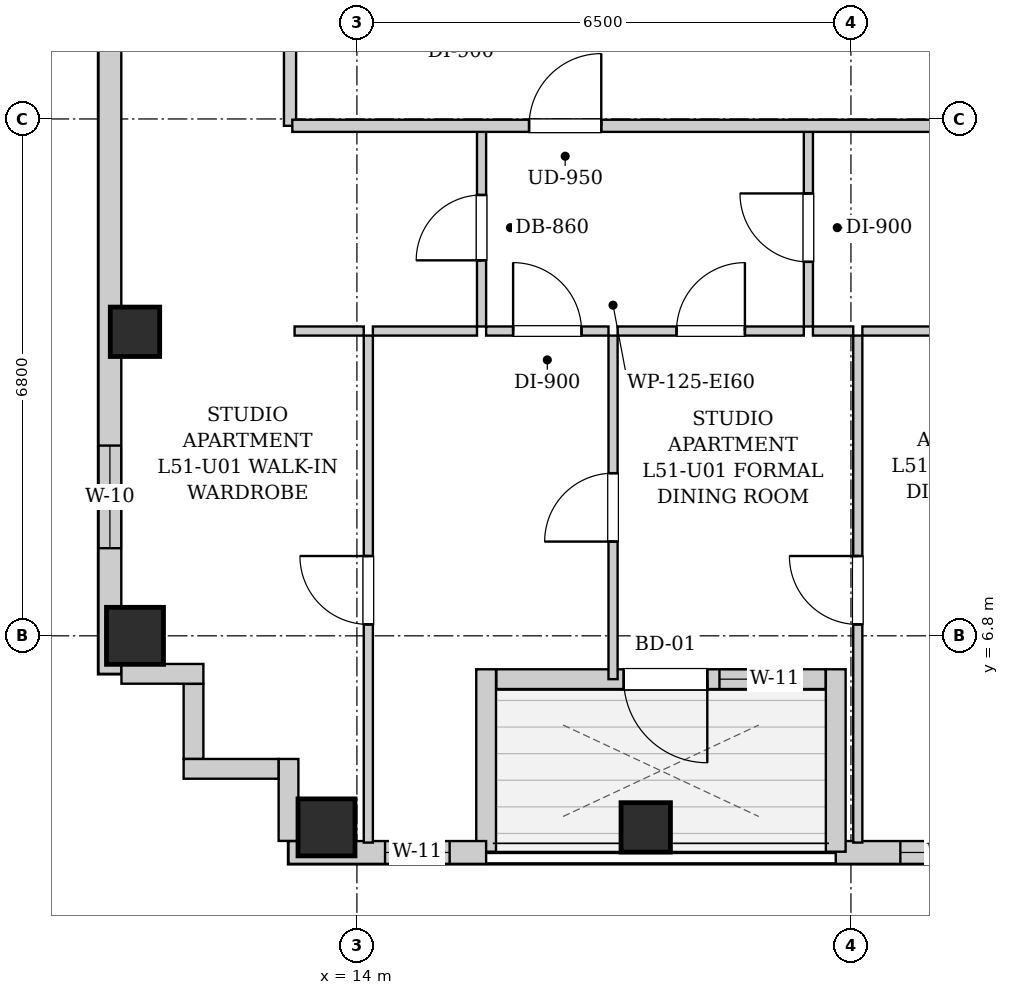
"""IFC4 building model, lengths in metres.
Left out: names, types, materials, properties, quantities, classifications, styles, units other than length and angle.
Written with IfcOpenShell. Run it as: python <this file> out.ifc"""

import sys

from ifc_helpers import new_model, si_unit, direction, frame, frame_2d, origin, origin_2d, place, context, subcontext, project, spatial, rectangle, extrude, element, fill, save


model = new_model("IFC4")
c1 = context("Model", 3, precision=1e-05, world=origin(), true_north=direction((0.0, 1.0)))
c2 = subcontext(c1, "Body", "Model", "MODEL_VIEW")
j1 = project(units=[si_unit("LENGTHUNIT", "METRE"), si_unit("PLANEANGLEUNIT", "RADIAN")], contexts=[c1])
p1 = place(None, origin())
s1 = spatial("IfcSite", under=j1, at=p1, CompositionType="ELEMENT")
p2 = place(p1, origin())
s2 = spatial("IfcBuilding", under=s1, at=p2, CompositionType="ELEMENT")
p3 = place(p2, frame((0.0, 0.0, 177.7)))
s3 = spatial("IfcBuildingStorey", under=s2, at=p3, CompositionType="ELEMENT", Elevation=177.7)
p4 = place(p3, frame((13.6, 4.28, 0.0), z_axis=(0.0, 0.0, 1.0), x_axis=(1.0, 0.0, 0.0)))
e1 = element("IfcColumn", 1, at=p4, inside=s3, PredefinedType="COLUMN", context=c2, shape_type="SweptSolid", body=[
    extrude(rectangle(XDim=0.75, YDim=0.75, at=origin_2d()), origin(), (0.0, 0.0, 1.0), 3.3),
])
p5 = place(p3, frame((17.8, 4.28, 0.0), z_axis=(0.0, 0.0, 1.0), x_axis=(1.0, 0.0, 0.0)))
e2 = element("IfcColumn", 2, at=p5, inside=s3, PredefinedType="COLUMN", context=c2, shape_type="SweptSolid", body=[
    extrude(rectangle(XDim=0.65, YDim=0.65, at=origin_2d()), origin(), (0.0, 0.0, 1.0), 3.3),
])
p6 = place(p3, frame((11.08, 6.8, 0.0), z_axis=(0.0, 0.0, 1.0), x_axis=(1.0, 0.0, 0.0)))
e3 = element("IfcColumn", 3, at=p6, inside=s3, PredefinedType="COLUMN", context=c2, shape_type="SweptSolid", body=[
    extrude(rectangle(XDim=0.75, YDim=0.75, at=origin_2d()), origin(), (0.0, 0.0, 1.0), 3.3),
])
p7 = place(p3, frame((11.08, 10.8, 0.0), z_axis=(0.0, 0.0, 1.0), x_axis=(1.0, 0.0, 0.0)))
e4 = element("IfcColumn", 4, at=p7, inside=s3, PredefinedType="COLUMN", context=c2, shape_type="SweptSolid", body=[
    extrude(rectangle(XDim=0.65, YDim=0.65, at=origin_2d()), origin(), (0.0, 0.0, 1.0), 3.3),
])
p8 = place(p3, frame((31.5, 3.95, 0.0), z_axis=(0.0, 0.0, 1.0), x_axis=(-1.0, 0.0, 0.0)))
e5 = element("IfcWall", 5, at=p8, inside=s3, PredefinedType="SOLIDWALL", context=c2, shape_type="SweptSolid", body=[
    extrude(rectangle(XDim=11.2, YDim=0.3, at=frame_2d((5.6, 0.0))), origin(), (0.0, 0.0, 1.0), 3.04),
])
p9 = place(p8, frame((9.0, 0.0, 0.55)))
e6 = element("IfcOpeningElement", 6, at=p9, cuts=e5, PredefinedType="OPENING", context=c2, shape_type="SweptSolid", body=[
    extrude(rectangle(XDim=1.35, YDim=1.2, at=frame_2d((0.675, 0.6))), frame((0.0, 0.16, 0.0), z_axis=(0.0, -1.0, 0.0), x_axis=(1.0, 0.0, 0.0)), (0.0, 0.0, 1.0), 0.32),
])
p10 = place(p8, frame((2.201, 0.0, 0.55)))
e7 = element("IfcOpeningElement", 7, at=p10, cuts=e5, PredefinedType="OPENING", context=c2, shape_type="SweptSolid", body=[
    extrude(rectangle(XDim=1.35, YDim=1.2, at=frame_2d((0.675, 0.6))), frame((0.0, 0.16, 0.0), z_axis=(0.0, -1.0, 0.0), x_axis=(1.0, 0.0, 0.0)), (0.0, 0.0, 1.0), 0.32),
])
p11 = place(p8, frame((0.35, 0.0, 0.55)))
e8 = element("IfcOpeningElement", 8, at=p11, cuts=e5, PredefinedType="OPENING", context=c2, shape_type="SweptSolid", body=[
    extrude(rectangle(XDim=0.68, YDim=1.2, at=frame_2d((0.34, 0.6))), frame((0.0, 0.16, 0.0), z_axis=(0.0, -1.0, 0.0), x_axis=(1.0, 0.0, 0.0)), (0.0, 0.0, 1.0), 0.32),
])
p12 = place(p3, frame((20.3, 3.96, 0.0), z_axis=(0.0, 0.0, 1.0), x_axis=(0.0, 1.0, 0.0)))
e9 = element("IfcWall", 9, at=p12, inside=s3, PredefinedType="SOLIDWALL", context=c2, shape_type="SweptSolid", body=[
    extrude(rectangle(XDim=2.4, YDim=0.26, at=frame_2d((1.2, 0.0))), origin(), (0.0, 0.0, 1.0), 3.04),
])
p13 = place(p3, frame((20.166, 6.23, 0.0), z_axis=(0.0, 0.0, 1.0), x_axis=(-1.0, 0.0, 0.0)))
e10 = element("IfcWall", 10, at=p13, inside=s3, PredefinedType="SOLIDWALL", context=c2, shape_type="SweptSolid", body=[
    extrude(rectangle(XDim=4.332, YDim=0.26, at=frame_2d((2.166, 0.0))), origin(), (0.0, 0.0, 1.0), 3.04),
])
p14 = place(p13, frame((1.556, 0.0, 0.0)))
e11 = element("IfcOpeningElement", 11, at=p14, cuts=e10, PredefinedType="OPENING", context=c2, shape_type="SweptSolid", body=[
    extrude(rectangle(XDim=1.1, YDim=2.0, at=frame_2d((0.55, 1.0))), frame((0.0, 0.14, 0.0), z_axis=(0.0, -1.0, 0.0), x_axis=(1.0, 0.0, 0.0)), (0.0, 0.0, 1.0), 0.28),
])
p15 = place(p13, frame((0.546, 0.0, 0.55)))
e12 = element("IfcOpeningElement", 12, at=p15, cuts=e10, PredefinedType="OPENING", context=c2, shape_type="SweptSolid", body=[
    extrude(rectangle(XDim=0.85, YDim=1.2, at=frame_2d((0.425, 0.6))), frame((0.0, 0.14, 0.0), z_axis=(0.0, -1.0, 0.0), x_axis=(1.0, 0.0, 0.0)), (0.0, 0.0, 1.0), 0.28),
])
p16 = place(p3, frame((15.7, 6.36, 0.0), z_axis=(0.0, 0.0, 1.0), x_axis=(0.0, -1.0, 0.0)))
e13 = element("IfcWall", 13, at=p16, inside=s3, PredefinedType="SOLIDWALL", context=c2, shape_type="SweptSolid", body=[
    extrude(rectangle(XDim=2.4, YDim=0.26, at=frame_2d((1.2, 0.0))), origin(), (0.0, 0.0, 1.0), 3.04),
])
p17 = place(p3, frame((15.7, 3.95, 0.0), z_axis=(0.0, 0.0, 1.0), x_axis=(-1.0, 0.0, 0.0)))
e14 = element("IfcWall", 14, at=p17, inside=s3, PredefinedType="SOLIDWALL", context=c2, shape_type="SweptSolid", body=[
    extrude(rectangle(XDim=2.6, YDim=0.3, at=frame_2d((1.3, 0.0))), origin(), (0.0, 0.0, 1.0), 3.04),
])
p18 = place(p17, frame((0.48, 0.0, 0.55)))
e15 = element("IfcOpeningElement", 15, at=p18, cuts=e14, PredefinedType="OPENING", context=c2, shape_type="SweptSolid", body=[
    extrude(rectangle(XDim=0.85, YDim=1.2, at=frame_2d((0.425, 0.6))), frame((0.0, 0.16, 0.0), z_axis=(0.0, -1.0, 0.0), x_axis=(1.0, 0.0, 0.0)), (0.0, 0.0, 1.0), 0.32),
])
p19 = place(p3, frame((10.75, 6.3, 0.0), z_axis=(0.0, 0.0, 1.0), x_axis=(0.0, 1.0, 0.0)))
e16 = element("IfcWall", 16, at=p19, inside=s3, PredefinedType="SOLIDWALL", context=c2, shape_type="SweptSolid", body=[
    extrude(rectangle(XDim=31.4, YDim=0.3, at=frame_2d((15.7, 0.0))), origin(), (0.0, 0.0, 1.0), 3.04),
])
p20 = place(p19, frame((1.653, 0.0, 0.55)))
e17 = element("IfcOpeningElement", 17, at=p20, cuts=e16, PredefinedType="OPENING", context=c2, shape_type="SweptSolid", body=[
    extrude(rectangle(XDim=1.35, YDim=1.2, at=frame_2d((0.675, 0.6))), frame((0.0, 0.16, 0.0), z_axis=(0.0, -1.0, 0.0), x_axis=(1.0, 0.0, 0.0)), (0.0, 0.0, 1.0), 0.32),
])
p21 = place(p19, frame((11.85, 0.0, 0.55)))
e18 = element("IfcOpeningElement", 18, at=p21, cuts=e16, PredefinedType="OPENING", context=c2, shape_type="SweptSolid", body=[
    extrude(rectangle(XDim=1.35, YDim=1.2, at=frame_2d((0.675, 0.6))), frame((0.0, 0.16, 0.0), z_axis=(0.0, -1.0, 0.0), x_axis=(1.0, 0.0, 0.0)), (0.0, 0.0, 1.0), 0.32),
])
p22 = place(p19, frame((9.185, 0.0, 0.55)))
e19 = element("IfcOpeningElement", 19, at=p22, cuts=e16, PredefinedType="OPENING", context=c2, shape_type="SweptSolid", body=[
    extrude(rectangle(XDim=1.35, YDim=1.2, at=frame_2d((0.675, 0.6))), frame((0.0, 0.16, 0.0), z_axis=(0.0, -1.0, 0.0), x_axis=(1.0, 0.0, 0.0)), (0.0, 0.0, 1.0), 0.32),
])
p23 = place(p19, frame((21.209, 0.0, 0.55)))
e20 = element("IfcOpeningElement", 20, at=p23, cuts=e16, PredefinedType="OPENING", context=c2, shape_type="SweptSolid", body=[
    extrude(rectangle(XDim=0.85, YDim=1.2, at=frame_2d((0.425, 0.6))), frame((0.0, 0.16, 0.0), z_axis=(0.0, -1.0, 0.0), x_axis=(1.0, 0.0, 0.0)), (0.0, 0.0, 1.0), 0.32),
])
p24 = place(p3, frame((13.1, 4.102, 0.0), z_axis=(0.0, 0.0, 1.0), x_axis=(0.0, 1.0, 0.0)))
e21 = element("IfcWall", 21, at=p24, inside=s3, PredefinedType="SOLIDWALL", context=c2, shape_type="SweptSolid", body=[
    extrude(rectangle(XDim=1.078, YDim=0.26, at=frame_2d((0.539, 0.0))), origin(), (0.0, 0.0, 1.0), 3.04),
])
p25 = place(p3, frame((12.968, 5.05, 0.0), z_axis=(0.0, 0.0, 1.0), x_axis=(-1.0, 0.0, 0.0)))
e22 = element("IfcWall", 22, at=p25, inside=s3, PredefinedType="SOLIDWALL", context=c2, shape_type="SweptSolid", body=[
    extrude(rectangle(XDim=1.248, YDim=0.26, at=frame_2d((0.624, 0.0))), origin(), (0.0, 0.0, 1.0), 3.04),
])
p26 = place(p3, frame((11.85, 5.182, 0.0), z_axis=(0.0, 0.0, 1.0), x_axis=(0.0, 1.0, 0.0)))
e23 = element("IfcWall", 23, at=p26, inside=s3, PredefinedType="SOLIDWALL", context=c2, shape_type="SweptSolid", body=[
    extrude(rectangle(XDim=0.986, YDim=0.26, at=frame_2d((0.493, 0.0))), origin(), (0.0, 0.0, 1.0), 3.04),
])
p27 = place(p3, frame((11.98, 6.3, 0.0), z_axis=(0.0, 0.0, 1.0), x_axis=(-1.0, 0.0, 0.0)))
e24 = element("IfcWall", 24, at=p27, inside=s3, PredefinedType="SOLIDWALL", context=c2, shape_type="SweptSolid", body=[
    extrude(rectangle(XDim=1.078, YDim=0.26, at=frame_2d((0.539, 0.0))), origin(), (0.0, 0.0, 1.0), 3.04),
])
p28 = place(p3, frame((13.12, 13.51, 0.0), z_axis=(0.0, 0.0, 1.0), x_axis=(0.0, 1.0, 0.0)))
e25 = element("IfcWall", 25, at=p28, inside=s3, PredefinedType="PARTITIONING", context=c2, shape_type="SweptSolid", body=[
    extrude(rectangle(XDim=1.58, YDim=0.16, at=frame_2d((0.79, 0.0))), origin(), (0.0, 0.0, 1.0), 3.04),
])
p29 = place(p3, frame((15.64, 10.87, 0.0), z_axis=(0.0, 0.0, 1.0), x_axis=(0.0, 1.0, 0.0)))
e26 = element("IfcWall", 26, at=p29, inside=s3, PredefinedType="PARTITIONING", context=c2, shape_type="SweptSolid", body=[
    extrude(rectangle(XDim=2.6, YDim=0.12, at=frame_2d((1.3, 0.0))), origin(), (0.0, 0.0, 1.0), 3.04),
])
p30 = place(p29, frame((0.87, 0.0, 0.0)))
e27 = element("IfcOpeningElement", 27, at=p30, cuts=e26, PredefinedType="OPENING", context=c2, shape_type="SweptSolid", body=[
    extrude(rectangle(XDim=0.86, YDim=2.05, at=frame_2d((0.43, 1.025))), frame((0.0, 0.07, 0.0), z_axis=(0.0, -1.0, 0.0), x_axis=(1.0, 0.0, 0.0)), (0.0, 0.0, 1.0), 0.14),
])
p31 = place(p3, frame((13.18, 10.81, 0.0), z_axis=(0.0, 0.0, 1.0), x_axis=(1.0, 0.0, 0.0)))
e28 = element("IfcWall", 28, at=p31, inside=s3, PredefinedType="PARTITIONING", context=c2, shape_type="SweptSolid", body=[
    extrude(rectangle(XDim=0.91, YDim=0.12, at=frame_2d((0.455, 0.0))), origin(), (0.0, 0.0, 1.0), 3.04),
])
p32 = place(p3, frame((14.21, 10.81, 0.0), z_axis=(0.0, 0.0, 1.0), x_axis=(1.0, 0.0, 0.0)))
e29 = element("IfcWall", 29, at=p32, inside=s3, PredefinedType="PARTITIONING", context=c2, shape_type="SweptSolid", body=[
    extrude(rectangle(XDim=1.37, YDim=0.12, at=frame_2d((0.685, 0.0))), origin(), (0.0, 0.0, 1.0), 3.04),
])
p33 = place(p3, frame((19.94, 10.87, 0.0), z_axis=(0.0, 0.0, 1.0), x_axis=(0.0, 1.0, 0.0)))
e30 = element("IfcWall", 30, at=p33, inside=s3, PredefinedType="PARTITIONING", context=c2, shape_type="SweptSolid", body=[
    extrude(rectangle(XDim=2.6, YDim=0.12, at=frame_2d((1.3, 0.0))), origin(), (0.0, 0.0, 1.0), 3.04),
])
p34 = place(p33, frame((0.85, 0.0, 0.0)))
e31 = element("IfcOpeningElement", 31, at=p34, cuts=e30, PredefinedType="OPENING", context=c2, shape_type="SweptSolid", body=[
    extrude(rectangle(XDim=0.9, YDim=2.05, at=frame_2d((0.45, 1.025))), frame((0.0, 0.07, 0.0), z_axis=(0.0, -1.0, 0.0), x_axis=(1.0, 0.0, 0.0)), (0.0, 0.0, 1.0), 0.14),
])
p35 = place(p3, frame((15.7, 10.81, 0.0), z_axis=(0.0, 0.0, 1.0), x_axis=(1.0, 0.0, 0.0)))
e32 = element("IfcWall", 32, at=p35, inside=s3, PredefinedType="PARTITIONING", context=c2, shape_type="SweptSolid", body=[
    extrude(rectangle(XDim=1.61, YDim=0.12, at=frame_2d((0.805, 0.0))), origin(), (0.0, 0.0, 1.0), 3.04),
])
p36 = place(p35, frame((0.355, 0.0, 0.0)))
e33 = element("IfcOpeningElement", 33, at=p36, cuts=e32, PredefinedType="OPENING", context=c2, shape_type="SweptSolid", body=[
    extrude(rectangle(XDim=0.9, YDim=2.05, at=frame_2d((0.45, 1.025))), frame((0.0, 0.07, 0.0), z_axis=(0.0, -1.0, 0.0), x_axis=(1.0, 0.0, 0.0)), (0.0, 0.0, 1.0), 0.14),
])
p37 = place(p3, frame((17.43, 10.81, 0.0), z_axis=(0.0, 0.0, 1.0), x_axis=(1.0, 0.0, 0.0)))
e34 = element("IfcWall", 34, at=p37, inside=s3, PredefinedType="PARTITIONING", context=c2, shape_type="SweptSolid", body=[
    extrude(rectangle(XDim=2.45, YDim=0.12, at=frame_2d((1.225, 0.0))), origin(), (0.0, 0.0, 1.0), 3.04),
])
p38 = place(p37, frame((0.775, 0.0, 0.0)))
e35 = element("IfcOpeningElement", 35, at=p38, cuts=e34, PredefinedType="OPENING", context=c2, shape_type="SweptSolid", body=[
    extrude(rectangle(XDim=0.9, YDim=2.05, at=frame_2d((0.45, 1.025))), frame((0.0, 0.07, 0.0), z_axis=(0.0, -1.0, 0.0), x_axis=(1.0, 0.0, 0.0)), (0.0, 0.0, 1.0), 0.14),
])
p39 = place(p3, frame((20.0, 10.81, 0.0), z_axis=(0.0, 0.0, 1.0), x_axis=(1.0, 0.0, 0.0)))
e36 = element("IfcWall", 36, at=p39, inside=s3, PredefinedType="PARTITIONING", context=c2, shape_type="SweptSolid", body=[
    extrude(rectangle(XDim=0.53, YDim=0.12, at=frame_2d((0.265, 0.0))), origin(), (0.0, 0.0, 1.0), 3.04),
])
p40 = place(p3, frame((20.65, 10.81, 0.0), z_axis=(0.0, 0.0, 1.0), x_axis=(1.0, 0.0, 0.0)))
e37 = element("IfcWall", 37, at=p40, inside=s3, PredefinedType="PARTITIONING", context=c2, shape_type="SweptSolid", body=[
    extrude(rectangle(XDim=2.735, YDim=0.12, at=frame_2d((1.368, 0.0))), origin(), (0.0, 0.0, 1.0), 3.04),
])
p41 = place(p40, frame((0.918, 0.0, 0.0)))
e38 = element("IfcOpeningElement", 38, at=p41, cuts=e37, PredefinedType="OPENING", context=c2, shape_type="SweptSolid", body=[
    extrude(rectangle(XDim=0.9, YDim=2.05, at=frame_2d((0.45, 1.025))), frame((0.0, 0.07, 0.0), z_axis=(0.0, -1.0, 0.0), x_axis=(1.0, 0.0, 0.0)), (0.0, 0.0, 1.0), 0.14),
])
p42 = place(p3, frame((14.15, 4.08, 0.0), z_axis=(0.0, 0.0, 1.0), x_axis=(0.0, 1.0, 0.0)))
e39 = element("IfcWall", 39, at=p42, inside=s3, PredefinedType="PARTITIONING", context=c2, shape_type="SweptSolid", body=[
    extrude(rectangle(XDim=6.67, YDim=0.12, at=frame_2d((3.335, 0.0))), origin(), (0.0, 0.0, 1.0), 3.04),
])
p43 = place(p42, frame((2.87, 0.0, 0.0)))
e40 = element("IfcOpeningElement", 40, at=p43, cuts=e39, PredefinedType="OPENING", context=c2, shape_type="SweptSolid", body=[
    extrude(rectangle(XDim=0.9, YDim=2.05, at=frame_2d((0.45, 1.025))), frame((0.0, 0.07, 0.0), z_axis=(0.0, -1.0, 0.0), x_axis=(1.0, 0.0, 0.0)), (0.0, 0.0, 1.0), 0.14),
])
p44 = place(p3, frame((17.37, 6.23, 0.0), z_axis=(0.0, 0.0, 1.0), x_axis=(0.0, 1.0, 0.0)))
e41 = element("IfcWall", 41, at=p44, inside=s3, PredefinedType="PARTITIONING", context=c2, shape_type="SweptSolid", body=[
    extrude(rectangle(XDim=4.52, YDim=0.12, at=frame_2d((2.26, 0.0))), origin(), (0.0, 0.0, 1.0), 3.04),
])
p45 = place(p44, frame((1.81, 0.0, 0.0)))
e42 = element("IfcOpeningElement", 42, at=p45, cuts=e41, PredefinedType="OPENING", context=c2, shape_type="SweptSolid", body=[
    extrude(rectangle(XDim=0.9, YDim=2.05, at=frame_2d((0.45, 1.025))), frame((0.0, 0.07, 0.0), z_axis=(0.0, -1.0, 0.0), x_axis=(1.0, 0.0, 0.0)), (0.0, 0.0, 1.0), 0.14),
])
p46 = place(p3, frame((20.59, 4.08, 0.0), z_axis=(0.0, 0.0, 1.0), x_axis=(0.0, 1.0, 0.0)))
e43 = element("IfcWall", 43, at=p46, inside=s3, PredefinedType="PARTITIONING", context=c2, shape_type="SweptSolid", body=[
    extrude(rectangle(XDim=6.67, YDim=0.12, at=frame_2d((3.335, 0.0))), origin(), (0.0, 0.0, 1.0), 3.04),
])
p47 = place(p46, frame((2.87, 0.0, 0.0)))
e44 = element("IfcOpeningElement", 44, at=p47, cuts=e43, PredefinedType="OPENING", context=c2, shape_type="SweptSolid", body=[
    extrude(rectangle(XDim=0.9, YDim=2.05, at=frame_2d((0.45, 1.025))), frame((0.0, 0.07, 0.0), z_axis=(0.0, -1.0, 0.0), x_axis=(1.0, 0.0, 0.0)), (0.0, 0.0, 1.0), 0.14),
])
p48 = place(p3, frame((13.15, 13.51, 0.0), z_axis=(0.0, 0.0, 1.0), x_axis=(1.0, 0.0, 0.0)))
e45 = element("IfcWall", 45, at=p48, inside=s3, PredefinedType="PARTITIONING", context=c2, shape_type="SweptSolid", body=[
    extrude(rectangle(XDim=24.6, YDim=0.16, at=frame_2d((12.3, 0.0))), origin(), (0.0, 0.0, 1.0), 3.04),
])
p49 = place(p48, frame((3.115, 0.0, 0.0)))
e46 = element("IfcOpeningElement", 46, at=p49, cuts=e45, PredefinedType="OPENING", context=c2, shape_type="SweptSolid", body=[
    extrude(rectangle(XDim=0.95, YDim=2.1, at=frame_2d((0.475, 1.05))), frame((0.0, 0.09, 0.0), z_axis=(0.0, -1.0, 0.0), x_axis=(1.0, 0.0, 0.0)), (0.0, 0.0, 1.0), 0.18),
])
p50 = place(p30, origin())
e47 = element("IfcDoor", 47, at=p50, inside=s3, OperationType="SINGLE_SWING_LEFT", PredefinedType="DOOR", context=c2, shape_type="SweptSolid", body=[
    extrude(rectangle(XDim=0.86, YDim=2.05, at=frame_2d((0.43, 1.025))), frame((0.0, 0.025, 0.0), z_axis=(0.0, -1.0, 0.0), x_axis=(1.0, 0.0, 0.0)), (0.0, 0.0, 1.0), 0.05),
])
fill(e27, e47)
p51 = place(p34, origin())
e48 = element("IfcDoor", 48, at=p51, inside=s3, OperationType="SINGLE_SWING_RIGHT", PredefinedType="DOOR", context=c2, shape_type="SweptSolid", body=[
    extrude(rectangle(XDim=0.9, YDim=2.05, at=frame_2d((0.45, 1.025))), frame((0.0, 0.025, 0.0), z_axis=(0.0, -1.0, 0.0), x_axis=(1.0, 0.0, 0.0)), (0.0, 0.0, 1.0), 0.05),
])
fill(e31, e48)
p52 = place(p36, origin())
e49 = element("IfcDoor", 49, at=p52, inside=s3, OperationType="SINGLE_SWING_LEFT", PredefinedType="DOOR", context=c2, shape_type="SweptSolid", body=[
    extrude(rectangle(XDim=0.9, YDim=2.05, at=frame_2d((0.45, 1.025))), frame((0.0, 0.025, 0.0), z_axis=(0.0, -1.0, 0.0), x_axis=(1.0, 0.0, 0.0)), (0.0, 0.0, 1.0), 0.05),
])
fill(e33, e49)
p53 = place(p38, origin())
e50 = element("IfcDoor", 50, at=p53, inside=s3, OperationType="SINGLE_SWING_RIGHT", PredefinedType="DOOR", context=c2, shape_type="SweptSolid", body=[
    extrude(rectangle(XDim=0.9, YDim=2.05, at=frame_2d((0.45, 1.025))), frame((0.0, 0.025, 0.0), z_axis=(0.0, -1.0, 0.0), x_axis=(1.0, 0.0, 0.0)), (0.0, 0.0, 1.0), 0.05),
])
fill(e35, e50)
p54 = place(p43, origin())
e51 = element("IfcDoor", 51, at=p54, inside=s3, OperationType="SINGLE_SWING_RIGHT", PredefinedType="DOOR", context=c2, shape_type="SweptSolid", body=[
    extrude(rectangle(XDim=0.9, YDim=2.05, at=frame_2d((0.45, 1.025))), frame((0.0, 0.025, 0.0), z_axis=(0.0, -1.0, 0.0), x_axis=(1.0, 0.0, 0.0)), (0.0, 0.0, 1.0), 0.05),
])
fill(e40, e51)
p55 = place(p45, origin())
e52 = element("IfcDoor", 52, at=p55, inside=s3, OperationType="SINGLE_SWING_LEFT", PredefinedType="DOOR", context=c2, shape_type="SweptSolid", body=[
    extrude(rectangle(XDim=0.9, YDim=2.05, at=frame_2d((0.45, 1.025))), frame((0.0, 0.025, 0.0), z_axis=(0.0, -1.0, 0.0), x_axis=(1.0, 0.0, 0.0)), (0.0, 0.0, 1.0), 0.05),
])
fill(e42, e52)
p56 = place(p47, origin())
e53 = element("IfcDoor", 53, at=p56, inside=s3, OperationType="SINGLE_SWING_RIGHT", PredefinedType="DOOR", context=c2, shape_type="SweptSolid", body=[
    extrude(rectangle(XDim=0.9, YDim=2.05, at=frame_2d((0.45, 1.025))), frame((0.0, 0.025, 0.0), z_axis=(0.0, -1.0, 0.0), x_axis=(1.0, 0.0, 0.0)), (0.0, 0.0, 1.0), 0.05),
])
fill(e44, e53)
p57 = place(p49, origin())
e54 = element("IfcDoor", 54, at=p57, inside=s3, OperationType="SINGLE_SWING_RIGHT", PredefinedType="DOOR", context=c2, shape_type="SweptSolid", body=[
    extrude(rectangle(XDim=0.95, YDim=2.1, at=frame_2d((0.475, 1.05))), frame((0.0, 0.025, 0.0), z_axis=(0.0, -1.0, 0.0), x_axis=(1.0, 0.0, 0.0)), (0.0, 0.0, 1.0), 0.05),
])
fill(e46, e54)
p58 = place(p14, origin())
e55 = element("IfcDoor", 55, at=p58, inside=s3, OperationType="SINGLE_SWING_LEFT", PredefinedType="DOOR", context=c2, shape_type="SweptSolid", body=[
    extrude(rectangle(XDim=1.1, YDim=2.0, at=frame_2d((0.55, 1.0))), frame((0.0, 0.025, 0.0), z_axis=(0.0, -1.0, 0.0), x_axis=(1.0, 0.0, 0.0)), (0.0, 0.0, 1.0), 0.05),
])
fill(e11, e55)
p59 = place(p20, origin())
e56 = element("IfcWindow", 56, at=p59, inside=s3, PartitioningType="SINGLE_PANEL", PredefinedType="WINDOW", context=c2, shape_type="SweptSolid", body=[
    extrude(rectangle(XDim=1.35, YDim=1.2, at=frame_2d((0.675, 0.6))), frame((0.0, 0.03, 0.0), z_axis=(0.0, -1.0, 0.0), x_axis=(1.0, 0.0, 0.0)), (0.0, 0.0, 1.0), 0.06),
])
fill(e17, e56)
p60 = place(p18, origin())
e57 = element("IfcWindow", 57, at=p60, inside=s3, PartitioningType="SINGLE_PANEL", PredefinedType="WINDOW", context=c2, shape_type="SweptSolid", body=[
    extrude(rectangle(XDim=0.85, YDim=1.2, at=frame_2d((0.425, 0.6))), frame((0.0, 0.03, 0.0), z_axis=(0.0, -1.0, 0.0), x_axis=(1.0, 0.0, 0.0)), (0.0, 0.0, 1.0), 0.06),
])
fill(e15, e57)
p61 = place(p15, origin())
e58 = element("IfcWindow", 58, at=p61, inside=s3, PartitioningType="SINGLE_PANEL", PredefinedType="WINDOW", context=c2, shape_type="SweptSolid", body=[
    extrude(rectangle(XDim=0.85, YDim=1.2, at=frame_2d((0.425, 0.6))), frame((0.0, 0.03, 0.0), z_axis=(0.0, -1.0, 0.0), x_axis=(1.0, 0.0, 0.0)), (0.0, 0.0, 1.0), 0.06),
])
fill(e12, e58)
p62 = place(p9, origin())
e59 = element("IfcWindow", 59, at=p62, inside=s3, PartitioningType="SINGLE_PANEL", PredefinedType="WINDOW", context=c2, shape_type="SweptSolid", body=[
    extrude(rectangle(XDim=1.35, YDim=1.2, at=frame_2d((0.675, 0.6))), frame((0.0, 0.03, 0.0), z_axis=(0.0, -1.0, 0.0), x_axis=(1.0, 0.0, 0.0)), (0.0, 0.0, 1.0), 0.06),
])
fill(e6, e59)
save(model, sys.argv[1])
